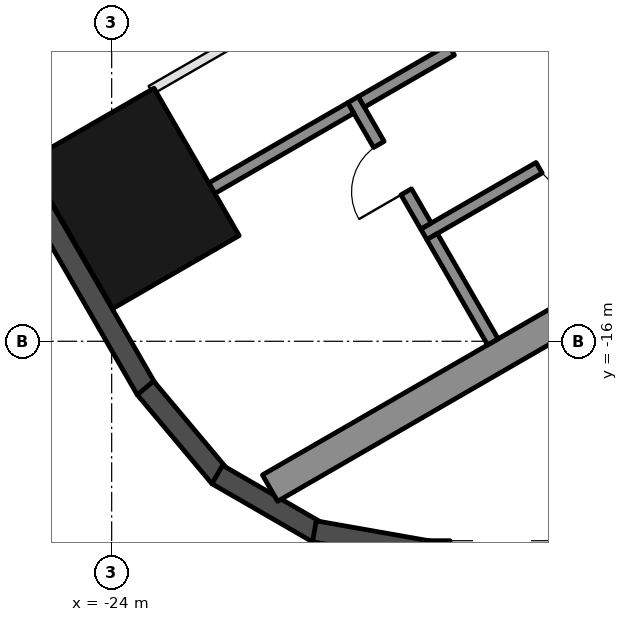
"""IFC4 building model, lengths in metres.
Left out: names, types, materials, properties, quantities, classifications, styles, units other than length and angle.
Written with IfcOpenShell. Run it as: python <this file> out.ifc"""

import sys

from ifc_helpers import new_model, si_unit, direction, frame, frame_2d, origin, origin_2d, place, context, subcontext, project, spatial, rectangle, hollow_rectangle, extrude, element, fill, save


model = new_model("IFC4")
c1 = context("Model", 3, precision=1e-05, world=origin(), true_north=direction((0.0, 1.0)))
c2 = subcontext(c1, "Body", "Model", "MODEL_VIEW")
j1 = project(units=[si_unit("LENGTHUNIT", "METRE"), si_unit("PLANEANGLEUNIT", "RADIAN")], contexts=[c1])
p1 = place(None, origin())
s1 = spatial("IfcSite", under=j1, at=p1, CompositionType="ELEMENT")
p2 = place(p1, origin())
s2 = spatial("IfcBuilding", under=s1, at=p2, CompositionType="ELEMENT")
p3 = place(p2, frame((0.0, 0.0, 50.2)))
s3 = spatial("IfcBuildingStorey", under=s2, at=p3, CompositionType="ELEMENT", Elevation=50.2)
p4 = place(p3, frame((-23.643, -13.65, 0.0), z_axis=(0.0, 0.0, 1.0), x_axis=(-0.5, 0.866025403784, 0.0)))
e1 = element("IfcColumn", 1, at=p4, inside=s3, PredefinedType="COLUMN", context=c2, shape_type="SweptSolid", body=[
    extrude(hollow_rectangle(XDim=2.8, YDim=2.4, WallThickness=0.07, at=origin_2d()), origin(), (0.0, 0.0, 1.0), 3.7),
])
p5 = place(p3, frame((-26.257, -11.893, 0.0), z_axis=(0.0, 0.0, 1.0), x_axis=(0.500018773155, -0.866014564827, 0.0)))
e2 = element("IfcWall", 2, at=p5, inside=s3, PredefinedType="SOLIDWALL", context=c2, shape_type="SweptSolid", body=[
    extrude(rectangle(XDim=5.658, YDim=0.35, at=frame_2d((2.829, 0.0))), origin(), (0.0, 0.0, 1.0), 3.55),
])
for number, where, z_axis, x_axis in (
    (3, (-23.445, -16.768, 0.0), (0.0, 0.0, 1.0), (0.643, -0.766, 0.0)),
    (4, (-22.264, -18.192, 0.0), (0.0, 0.0, 1.0), (0.866, -0.5, 0.0)),
):
    element("IfcWall", number, at=place(p3, frame(where, z_axis=z_axis, x_axis=x_axis)), inside=s3, PredefinedType="SOLIDWALL", context=c2, shape_type="SweptSolid", body=[
        extrude(rectangle(XDim=1.91, YDim=0.35, at=frame_2d((0.955, 0.0))), origin(), (0.0, 0.0, 1.0), 3.55),
    ])
p6 = place(p3, frame((-20.667, -19.126, 0.0), z_axis=(0.0, 0.0, 1.0), x_axis=(0.984798995425, -0.173697837091, 0.0)))
e5 = element("IfcWall", 5, at=p6, inside=s3, PredefinedType="SOLIDWALL", context=c2, shape_type="SweptSolid", body=[
    extrude(rectangle(XDim=1.91, YDim=0.35, at=frame_2d((0.955, 0.0))), origin(), (0.0, 0.0, 1.0), 3.55),
])
p7 = place(p3, frame((-18.816, -19.455, 0.0), z_axis=(0.0, 0.0, 1.0), x_axis=(1.0, 0.0, 0.0)))
e6 = element("IfcWall", 6, at=p7, inside=s3, PredefinedType="SOLIDWALL", context=c2, shape_type="SweptSolid", body=[
    extrude(rectangle(XDim=11.816, YDim=0.35, at=frame_2d((5.908, 0.0))), origin(), (0.0, 0.0, 1.0), 3.55),
])
p8 = place(p7, frame((0.381, 0.0, 0.3)))
e7 = element("IfcOpeningElement", 7, at=p8, cuts=e6, PredefinedType="OPENING", context=c2, shape_type="SweptSolid", body=[
    extrude(rectangle(XDim=1.7, YDim=2.65, at=frame_2d((0.85, 1.325))), frame((0.0, 0.185, 0.0), z_axis=(0.0, -1.0, 0.0), x_axis=(1.0, 0.0, 0.0)), (0.0, 0.0, 1.0), 0.37),
])
p9 = place(p7, frame((7.665, 0.0, 0.0)))
e8 = element("IfcOpeningElement", 8, at=p9, cuts=e6, PredefinedType="OPENING", context=c2, shape_type="SweptSolid", body=[
    extrude(rectangle(XDim=2.4, YDim=2.4, at=frame_2d((1.2, 1.2))), frame((0.0, 0.185, 0.0), z_axis=(0.0, -1.0, 0.0), x_axis=(1.0, 0.0, 0.0)), (0.0, 0.0, 1.0), 0.37),
])
p10 = place(p7, frame((3.866, 0.0, 0.3)))
e9 = element("IfcOpeningElement", 9, at=p10, cuts=e6, PredefinedType="OPENING", context=c2, shape_type="SweptSolid", body=[
    extrude(rectangle(XDim=1.5, YDim=2.65, at=frame_2d((0.75, 1.325))), frame((0.0, 0.185, 0.0), z_axis=(0.0, -1.0, 0.0), x_axis=(1.0, 0.0, 0.0)), (0.0, 0.0, 1.0), 0.37),
])
p11 = place(p7, frame((5.666, 0.0, 0.3)))
e10 = element("IfcOpeningElement", 10, at=p11, cuts=e6, PredefinedType="OPENING", context=c2, shape_type="SweptSolid", body=[
    extrude(rectangle(XDim=1.5, YDim=2.65, at=frame_2d((0.75, 1.325))), frame((0.0, 0.185, 0.0), z_axis=(0.0, -1.0, 0.0), x_axis=(1.0, 0.0, 0.0)), (0.0, 0.0, 1.0), 0.37),
])
p12 = place(p3, frame((-8.547, -10.997, 0.0), z_axis=(0.0, 0.0, 1.0), x_axis=(-0.866025009528, -0.500000682871, 0.0)))
e11 = element("IfcWall", 11, at=p12, inside=s3, PredefinedType="SHEAR", context=c2, shape_type="SweptSolid", body=[
    extrude(rectangle(XDim=14.837, YDim=0.5, at=frame_2d((7.418, 0.0))), origin(), (0.0, 0.0, 1.0), 3.5),
])
p13 = place(p3, frame((-10.068, -9.162, 0.0), z_axis=(0.0, 0.0, 1.0), x_axis=(-0.866032725843, -0.499987317609, 0.0)))
e12 = element("IfcWall", 12, at=p13, inside=s3, PredefinedType="SHEAR", context=c2, shape_type="SweptSolid", body=[
    extrude(rectangle(XDim=10.16, YDim=0.2, at=frame_2d((5.08, 0.0))), origin(), (0.0, 0.0, 1.0), 3.5),
])
p14 = place(p13, frame((1.99, 0.0, 0.0)))
e13 = element("IfcOpeningElement", 13, at=p14, cuts=e12, PredefinedType="OPENING", context=c2, shape_type="SweptSolid", body=[
    extrude(rectangle(XDim=0.9, YDim=2.1, at=frame_2d((0.45, 1.05))), frame((0.0, 0.11, 0.0), z_axis=(0.0, -1.0, 0.0), x_axis=(1.0, 0.0, 0.0)), (0.0, 0.0, 1.0), 0.22),
])
p15 = place(p13, frame((7.07, 0.0, 0.0)))
e14 = element("IfcOpeningElement", 14, at=p15, cuts=e12, PredefinedType="OPENING", context=c2, shape_type="SweptSolid", body=[
    extrude(rectangle(XDim=0.9, YDim=2.1, at=frame_2d((0.45, 1.05))), frame((0.0, 0.11, 0.0), z_axis=(0.0, -1.0, 0.0), x_axis=(1.0, 0.0, 0.0)), (0.0, 0.0, 1.0), 0.22),
])
p16 = place(p3, frame((-20.031, -12.026, 0.0), z_axis=(0.0, 0.0, 1.0), x_axis=(0.500033551112, -0.866006032174, 0.0)))
e15 = element("IfcWall", 15, at=p16, inside=s3, PredefinedType="SHEAR", context=c2, shape_type="SweptSolid", body=[
    extrude(rectangle(XDim=2.4, YDim=0.2, at=frame_2d((1.2, 0.0))), origin(), (0.0, 0.0, 1.0), 3.5),
])
p17 = place(p16, frame((0.85, 0.0, 0.0)))
e16 = element("IfcOpeningElement", 16, at=p17, cuts=e15, PredefinedType="OPENING", context=c2, shape_type="SweptSolid", body=[
    extrude(rectangle(XDim=0.9, YDim=2.1, at=frame_2d((0.45, 1.05))), frame((0.0, 0.11, 0.0), z_axis=(0.0, -1.0, 0.0), x_axis=(1.0, 0.0, 0.0)), (0.0, 0.0, 1.0), 0.22),
])
p18 = place(p3, frame((-18.413, -11.208, 0.0), z_axis=(0.0, 0.0, 1.0), x_axis=(-0.866038183914, -0.499977863513, 0.0)))
e17 = element("IfcWall", 17, at=p18, inside=s3, PredefinedType="SHEAR", context=c2, shape_type="SweptSolid", body=[
    extrude(rectangle(XDim=1.71, YDim=0.2, at=frame_2d((0.855, 0.0))), origin(), (0.0, 0.0, 1.0), 3.5),
])
p19 = place(p3, frame((-18.73, -14.278, 0.0), z_axis=(0.0, 0.0, 1.0), x_axis=(0.50002537861, -0.866010750942, 0.0)))
e18 = element("IfcWall", 18, at=p19, inside=s3, PredefinedType="SHEAR", context=c2, shape_type="SweptSolid", body=[
    extrude(rectangle(XDim=2.0, YDim=0.2, at=frame_2d((1.0, 0.0))), origin(), (0.0, 0.0, 1.0), 3.5),
])
p20 = place(p3, frame((-20.067, -12.163, 0.0), z_axis=(0.0, 0.0, 1.0), x_axis=(-0.866060851709, -0.499938597367, 0.0)))
e19 = element("IfcWall", 19, at=p20, inside=s3, PredefinedType="SHEAR", context=c2, shape_type="SweptSolid", body=[
    extrude(rectangle(XDim=2.64, YDim=0.2, at=frame_2d((1.32, 0.0))), origin(), (0.0, 0.0, 1.0), 3.5),
])
p21 = place(p3, frame((-19.363, -9.562, 0.0), z_axis=(0.0, 0.0, 1.0), x_axis=(-0.86601185002, -0.500023475074, 0.0)))
e20 = element("IfcWall", 20, at=p21, inside=s3, PredefinedType="PARTITIONING", context=c2, shape_type="SweptSolid", body=[
    extrude(rectangle(XDim=4.61, YDim=0.15, at=frame_2d((2.305, 0.0))), origin(), (0.0, 0.0, 1.0), 3.5),
])
p22 = place(p15, origin())
e21 = element("IfcDoor", 21, at=p22, inside=s3, OperationType="SINGLE_SWING_LEFT", PredefinedType="DOOR", context=c2, shape_type="SweptSolid", body=[
    extrude(rectangle(XDim=0.9, YDim=2.1, at=frame_2d((0.45, 1.05))), frame((0.0, 0.025, 0.0), z_axis=(0.0, -1.0, 0.0), x_axis=(1.0, 0.0, 0.0)), (0.0, 0.0, 1.0), 0.05),
])
fill(e14, e21)
p23 = place(p17, frame((0.9, 0.0, 0.0), z_axis=(0.0, 0.0, 1.0), x_axis=(-1.0, 0.0, 0.0)))
e22 = element("IfcDoor", 22, at=p23, inside=s3, OperationType="SINGLE_SWING_LEFT", PredefinedType="DOOR", context=c2, shape_type="SweptSolid", body=[
    extrude(rectangle(XDim=0.9, YDim=2.1, at=frame_2d((0.45, 1.05))), frame((0.0, 0.025, 0.0), z_axis=(0.0, -1.0, 0.0), x_axis=(1.0, 0.0, 0.0)), (0.0, 0.0, 1.0), 0.05),
])
fill(e16, e22)
save(model, sys.argv[1])
